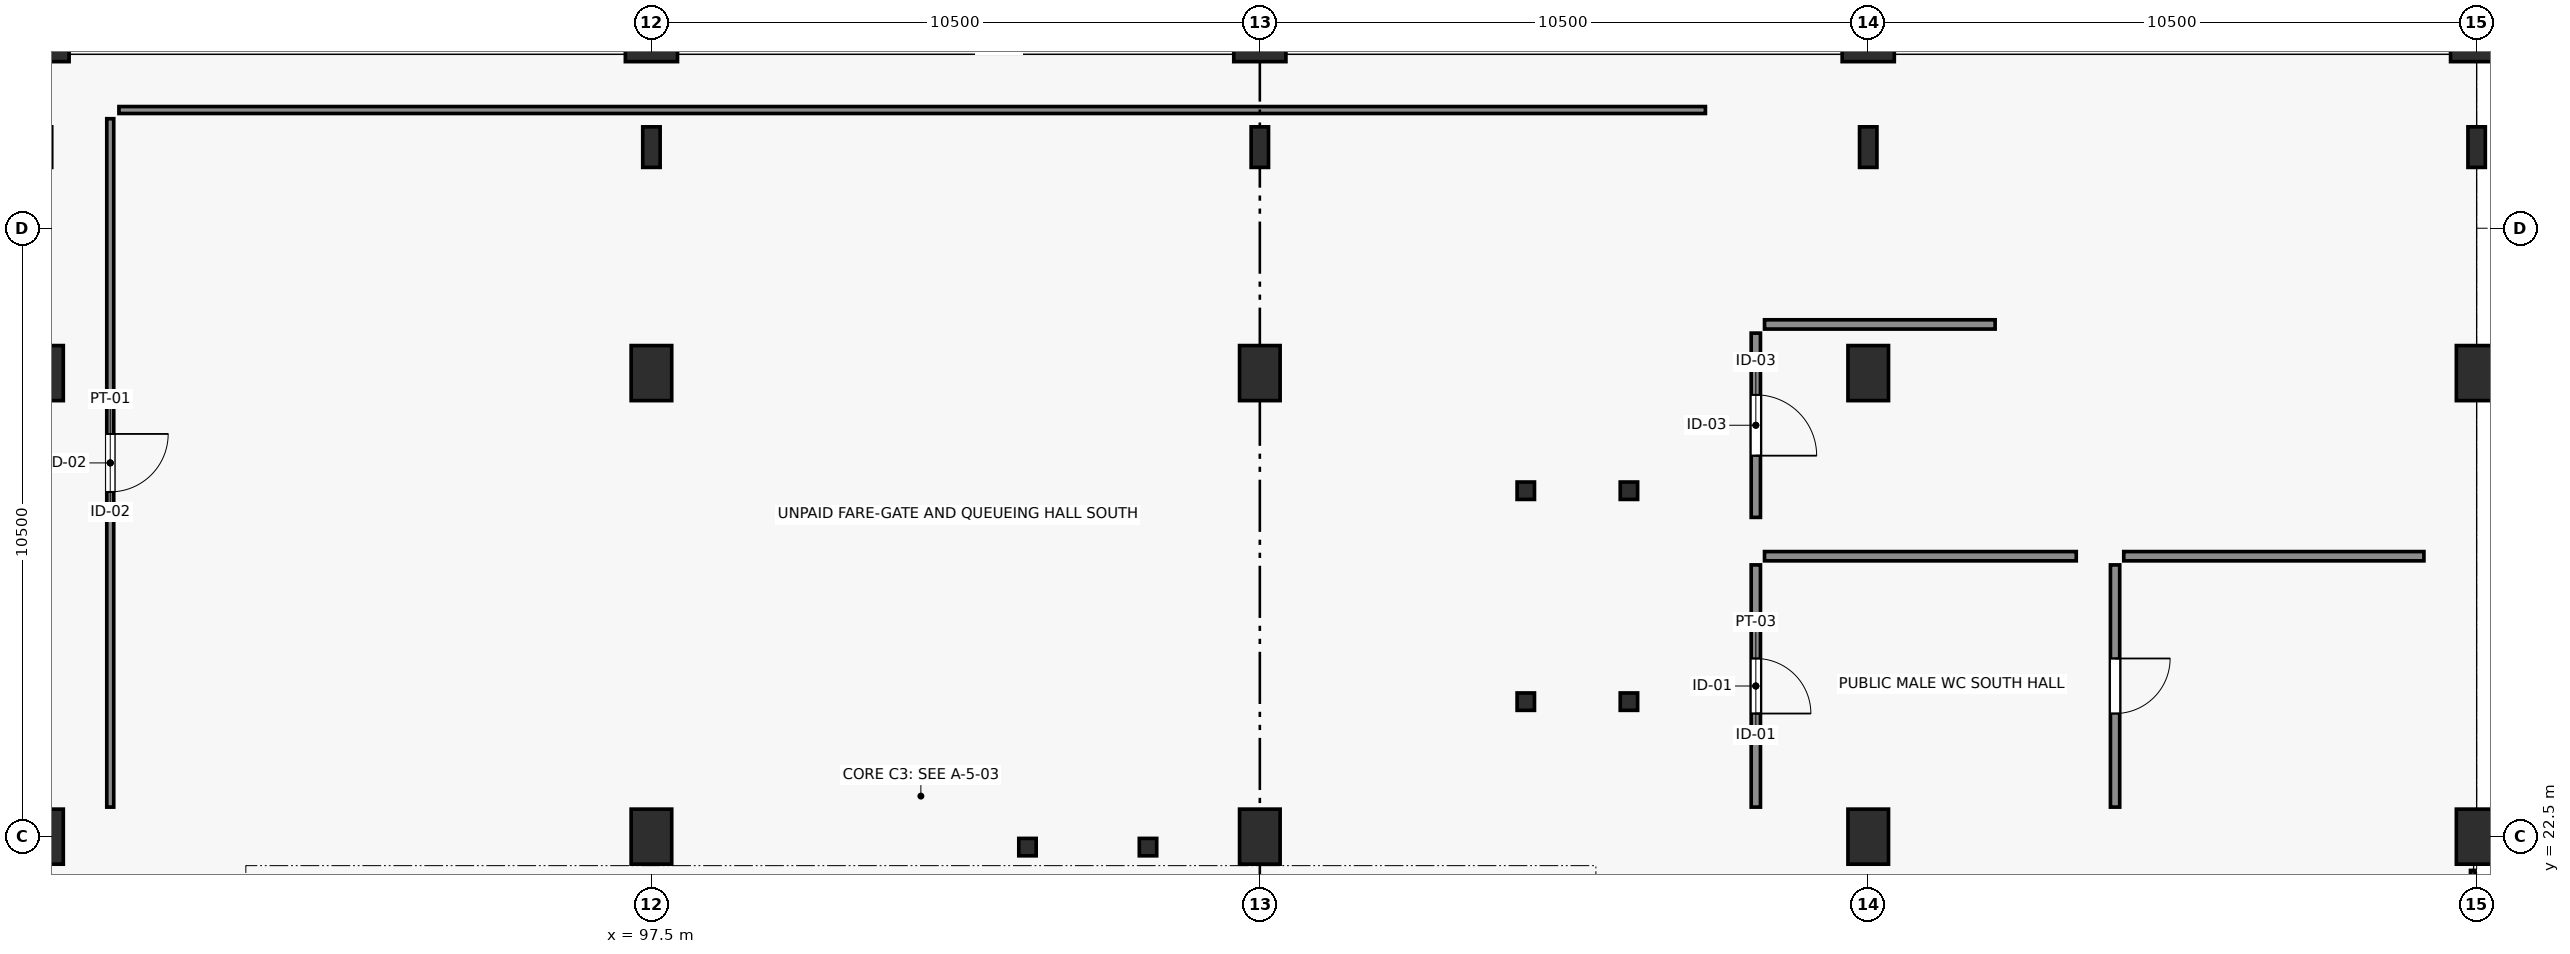
"""IFC4 building model, lengths in metres.
Left out: names, types, materials, properties, quantities, classifications, styles, units other than length and angle.
Written with IfcOpenShell. Run it as: python <this file> out.ifc"""

import sys

from ifc_helpers import new_model, si_unit, direction, frame, frame_2d, origin, origin_2d, place, context, subcontext, project, spatial, rectangle, hollow_rectangle, i_section, extrude, element, fill, save


model = new_model("IFC4")
c1 = context("Model", 3, precision=1e-05, world=origin(), true_north=direction((0.0, 1.0)))
c2 = subcontext(c1, "Body", "Model", "MODEL_VIEW")
j1 = project(units=[si_unit("LENGTHUNIT", "METRE"), si_unit("PLANEANGLEUNIT", "RADIAN")], contexts=[c1])
p1 = place(None, origin())
s1 = spatial("IfcSite", under=j1, at=p1, CompositionType="ELEMENT")
p2 = place(p1, origin())
s2 = spatial("IfcBuilding", under=s1, at=p2, CompositionType="ELEMENT")
p3 = place(p2, origin())
s3 = spatial("IfcBuildingStorey", under=s2, at=p3, CompositionType="ELEMENT", Elevation=0.0)
for number, where, z_axis, x_axis in (
    (1, (87.0, 36.5, 0.0), (0.0, 0.0, 1.0), (1.0, 0.0, 0.0)),
    (2, (97.5, 36.5, 0.0), (0.0, 0.0, 1.0), (1.0, 0.0, 0.0)),
    (3, (108.0, 36.5, 0.0), (0.0, 0.0, 1.0), (1.0, 0.0, 0.0)),
    (4, (118.5, 36.5, 0.0), (0.0, 0.0, 1.0), (1.0, 0.0, 0.0)),
    (5, (129.0, 36.5, 0.0), (0.0, 0.0, 1.0), (1.0, 0.0, 0.0)),
):
    element("IfcColumn", number, at=place(p3, frame(where, z_axis=z_axis, x_axis=x_axis)), inside=s3, PredefinedType="COLUMN", context=c2, shape_type="SweptSolid", body=[
        extrude(rectangle(XDim=0.9, YDim=1.25, at=origin_2d()), origin(), (0.0, 0.0, 1.0), 4.8),
    ])
for number, where, z_axis, x_axis in (
    (6, (87.0, 22.5, 0.0), (0.0, 0.0, 1.0), (1.0, 0.0, 0.0)),
    (7, (97.5, 22.5, 0.0), (0.0, 0.0, 1.0), (1.0, 0.0, 0.0)),
    (8, (108.0, 22.5, 0.0), (0.0, 0.0, 1.0), (1.0, 0.0, 0.0)),
    (9, (118.5, 22.5, 0.0), (0.0, 0.0, 1.0), (1.0, 0.0, 0.0)),
    (10, (129.0, 22.5, 0.0), (0.0, 0.0, 1.0), (1.0, 0.0, 0.0)),
    (11, (87.0, 30.5, 0.0), (0.0, 0.0, 1.0), (1.0, 0.0, 0.0)),
    (12, (97.5, 30.5, 0.0), (0.0, 0.0, 1.0), (1.0, 0.0, 0.0)),
    (13, (108.0, 30.5, 0.0), (0.0, 0.0, 1.0), (1.0, 0.0, 0.0)),
    (14, (118.5, 30.5, 0.0), (0.0, 0.0, 1.0), (1.0, 0.0, 0.0)),
    (15, (129.0, 30.5, 0.0), (0.0, 0.0, 1.0), (1.0, 0.0, 0.0)),
):
    element("IfcColumn", number, at=place(p3, frame(where, z_axis=z_axis, x_axis=x_axis)), inside=s3, PredefinedType="COLUMN", context=c2, shape_type="SweptSolid", body=[
        extrude(rectangle(XDim=0.7, YDim=0.95, at=origin_2d()), origin(), (0.0, 0.0, 1.0), 4.61),
    ])
for number, where, z_axis, x_axis in (
    (16, (97.5, 34.4, 0.0), (0.0, 0.0, 1.0), (1.0, 0.0, 0.0)),
    (17, (108.0, 34.4, 0.0), (0.0, 0.0, 1.0), (1.0, 0.0, 0.0)),
    (18, (118.5, 34.4, 0.0), (0.0, 0.0, 1.0), (1.0, 0.0, 0.0)),
    (19, (129.0, 34.4, 0.0), (0.0, 0.0, 1.0), (1.0, 0.0, 0.0)),
):
    element("IfcColumn", number, at=place(p3, frame(where, z_axis=z_axis, x_axis=x_axis)), inside=s3, PredefinedType="COLUMN", context=c2, shape_type="SweptSolid", body=[
        extrude(i_section(OverallWidth=0.3, OverallDepth=0.7, WebThickness=0.017, FlangeThickness=0.032, FilletRadius=0.027, at=origin_2d()), origin(), (0.0, 0.0, 1.0), 4.605),
    ])
p4 = place(p3, frame((88.16, 34.89, 0.0), z_axis=(0.0, 0.0, 1.0), x_axis=(0.0, -1.0, 0.0)))
e20 = element("IfcWall", 20, at=p4, inside=s3, PredefinedType="PARTITIONING", context=c2, shape_type="SweptSolid", body=[
    extrude(rectangle(XDim=11.88, YDim=0.12, at=frame_2d((5.94, 0.0))), origin(), (0.0, 0.0, 1.0), 4.185),
])
p5 = place(p4, frame((5.44, 0.0, 0.0)))
e21 = element("IfcOpeningElement", 21, at=p5, cuts=e20, PredefinedType="OPENING", context=c2, shape_type="SweptSolid", body=[
    extrude(rectangle(XDim=1.0, YDim=2.15, at=frame_2d((0.5, 1.075))), frame((0.0, 0.07, 0.0), z_axis=(0.0, -1.0, 0.0), x_axis=(1.0, 0.0, 0.0)), (0.0, 0.0, 1.0), 0.14),
])
p6 = place(p3, frame((88.31, 35.04, 0.0), z_axis=(0.0, 0.0, 1.0), x_axis=(1.0, 0.0, 0.0)))
e22 = element("IfcWall", 22, at=p6, inside=s3, PredefinedType="PARTITIONING", context=c2, shape_type="SweptSolid", body=[
    extrude(rectangle(XDim=27.38, YDim=0.12, at=frame_2d((13.69, 0.0))), origin(), (0.0, 0.0, 1.0), 4.55),
])
p7 = place(p3, frame((116.56, 27.19, 0.0), z_axis=(0.0, 0.0, 1.0), x_axis=(0.0, -1.0, 0.0)))
e23 = element("IfcWall", 23, at=p7, inside=s3, PredefinedType="PARTITIONING", context=c2, shape_type="SweptSolid", body=[
    extrude(rectangle(XDim=4.18, YDim=0.16, at=frame_2d((2.09, 0.0))), origin(), (0.0, 0.0, 1.0), 4.55),
])
p8 = place(p7, frame((1.615, 0.0, 0.0)))
e24 = element("IfcOpeningElement", 24, at=p8, cuts=e23, PredefinedType="OPENING", context=c2, shape_type="SweptSolid", body=[
    extrude(rectangle(XDim=0.95, YDim=2.15, at=frame_2d((0.475, 1.075))), frame((0.0, 0.09, 0.0), z_axis=(0.0, -1.0, 0.0), x_axis=(1.0, 0.0, 0.0)), (0.0, 0.0, 1.0), 0.18),
])
p9 = place(p3, frame((116.71, 27.34, 0.0), z_axis=(0.0, 0.0, 1.0), x_axis=(1.0, 0.0, 0.0)))
e25 = element("IfcWall", 25, at=p9, inside=s3, PredefinedType="PARTITIONING", context=c2, shape_type="SweptSolid", body=[
    extrude(rectangle(XDim=5.38, YDim=0.16, at=frame_2d((2.69, 0.0))), origin(), (0.0, 0.0, 1.0), 4.185),
])
p10 = place(p3, frame((122.76, 27.19, 0.0), z_axis=(0.0, 0.0, 1.0), x_axis=(0.0, -1.0, 0.0)))
e26 = element("IfcWall", 26, at=p10, inside=s3, PredefinedType="PARTITIONING", context=c2, shape_type="SweptSolid", body=[
    extrude(rectangle(XDim=4.18, YDim=0.16, at=frame_2d((2.09, 0.0))), origin(), (0.0, 0.0, 1.0), 4.55),
])
p11 = place(p10, frame((1.615, 0.0, 0.0)))
e27 = element("IfcOpeningElement", 27, at=p11, cuts=e26, PredefinedType="OPENING", context=c2, shape_type="SweptSolid", body=[
    extrude(rectangle(XDim=0.95, YDim=2.15, at=frame_2d((0.475, 1.075))), frame((0.0, 0.09, 0.0), z_axis=(0.0, -1.0, 0.0), x_axis=(1.0, 0.0, 0.0)), (0.0, 0.0, 1.0), 0.18),
])
p12 = place(p3, frame((122.91, 27.34, 0.0), z_axis=(0.0, 0.0, 1.0), x_axis=(1.0, 0.0, 0.0)))
e28 = element("IfcWall", 28, at=p12, inside=s3, PredefinedType="PARTITIONING", context=c2, shape_type="SweptSolid", body=[
    extrude(rectangle(XDim=5.18, YDim=0.16, at=frame_2d((2.59, 0.0))), origin(), (0.0, 0.0, 1.0), 4.355),
])
p13 = place(p3, frame((116.56, 31.19, 0.0), z_axis=(0.0, 0.0, 1.0), x_axis=(0.0, -1.0, 0.0)))
e29 = element("IfcWall", 29, at=p13, inside=s3, PredefinedType="PARTITIONING", context=c2, shape_type="SweptSolid", body=[
    extrude(rectangle(XDim=3.18, YDim=0.16, at=frame_2d((1.59, 0.0))), origin(), (0.0, 0.0, 1.0), 4.55),
])
p14 = place(p13, frame((1.065, 0.0, 0.0)))
e30 = element("IfcOpeningElement", 30, at=p14, cuts=e29, PredefinedType="OPENING", context=c2, shape_type="SweptSolid", body=[
    extrude(rectangle(XDim=1.05, YDim=2.2, at=frame_2d((0.525, 1.1))), frame((0.0, 0.09, 0.0), z_axis=(0.0, -1.0, 0.0), x_axis=(1.0, 0.0, 0.0)), (0.0, 0.0, 1.0), 0.18),
])
p15 = place(p3, frame((116.71, 31.34, 0.0), z_axis=(0.0, 0.0, 1.0), x_axis=(1.0, 0.0, 0.0)))
e31 = element("IfcWall", 31, at=p15, inside=s3, PredefinedType="PARTITIONING", context=c2, shape_type="SweptSolid", body=[
    extrude(rectangle(XDim=3.98, YDim=0.16, at=frame_2d((1.99, 0.0))), origin(), (0.0, 0.0, 1.0), 4.185),
])
for number, where, z_axis, x_axis in (
    (32, (106.07, 22.32, 0.0), (0.0, 0.0, 1.0), (1.0, 0.0, 0.0)),
    (33, (103.99, 22.32, 0.0), (0.0, 0.0, 1.0), (1.0, 0.0, 0.0)),
    (34, (112.59, 24.83, 0.0), (0.0, 0.0, 1.0), (1.0, 0.0, 0.0)),
    (35, (114.37, 24.83, 0.0), (0.0, 0.0, 1.0), (1.0, 0.0, 0.0)),
    (36, (114.37, 28.47, 0.0), (0.0, 0.0, 1.0), (1.0, 0.0, 0.0)),
    (37, (112.59, 28.47, 0.0), (0.0, 0.0, 1.0), (1.0, 0.0, 0.0)),
):
    element("IfcColumn", number, at=place(p3, frame(where, z_axis=z_axis, x_axis=x_axis)), inside=s3, PredefinedType="COLUMN", context=c2, shape_type="SweptSolid", body=[
        extrude(hollow_rectangle(XDim=0.3, YDim=0.3, WallThickness=0.016, at=origin_2d()), origin(), (0.0, 0.0, 1.0), 4.8),
    ])
p16 = place(p5, origin())
e38 = element("IfcDoor", 38, at=p16, inside=s3, OperationType="SINGLE_SWING_LEFT", PredefinedType="DOOR", context=c2, shape_type="SweptSolid", body=[
    extrude(rectangle(XDim=1.0, YDim=2.15, at=frame_2d((0.5, 1.075))), frame((0.0, 0.025, 0.0), z_axis=(0.0, -1.0, 0.0), x_axis=(1.0, 0.0, 0.0)), (0.0, 0.0, 1.0), 0.05),
])
fill(e21, e38)
p17 = place(p8, origin())
e39 = element("IfcDoor", 39, at=p17, inside=s3, OperationType="SINGLE_SWING_RIGHT", PredefinedType="DOOR", context=c2, shape_type="SweptSolid", body=[
    extrude(rectangle(XDim=0.95, YDim=2.15, at=frame_2d((0.475, 1.075))), frame((0.0, 0.025, 0.0), z_axis=(0.0, -1.0, 0.0), x_axis=(1.0, 0.0, 0.0)), (0.0, 0.0, 1.0), 0.05),
])
fill(e24, e39)
p18 = place(p11, origin())
e40 = element("IfcDoor", 40, at=p18, inside=s3, OperationType="SINGLE_SWING_LEFT", PredefinedType="DOOR", context=c2, shape_type="SweptSolid", body=[
    extrude(rectangle(XDim=0.95, YDim=2.15, at=frame_2d((0.475, 1.075))), frame((0.0, 0.025, 0.0), z_axis=(0.0, -1.0, 0.0), x_axis=(1.0, 0.0, 0.0)), (0.0, 0.0, 1.0), 0.05),
])
fill(e27, e40)
p19 = place(p14, origin())
e41 = element("IfcDoor", 41, at=p19, inside=s3, OperationType="SINGLE_SWING_RIGHT", PredefinedType="DOOR", context=c2, shape_type="SweptSolid", body=[
    extrude(rectangle(XDim=1.05, YDim=2.2, at=frame_2d((0.525, 1.1))), frame((0.0, 0.025, 0.0), z_axis=(0.0, -1.0, 0.0), x_axis=(1.0, 0.0, 0.0)), (0.0, 0.0, 1.0), 0.05),
])
fill(e30, e41)
save(model, sys.argv[1])
